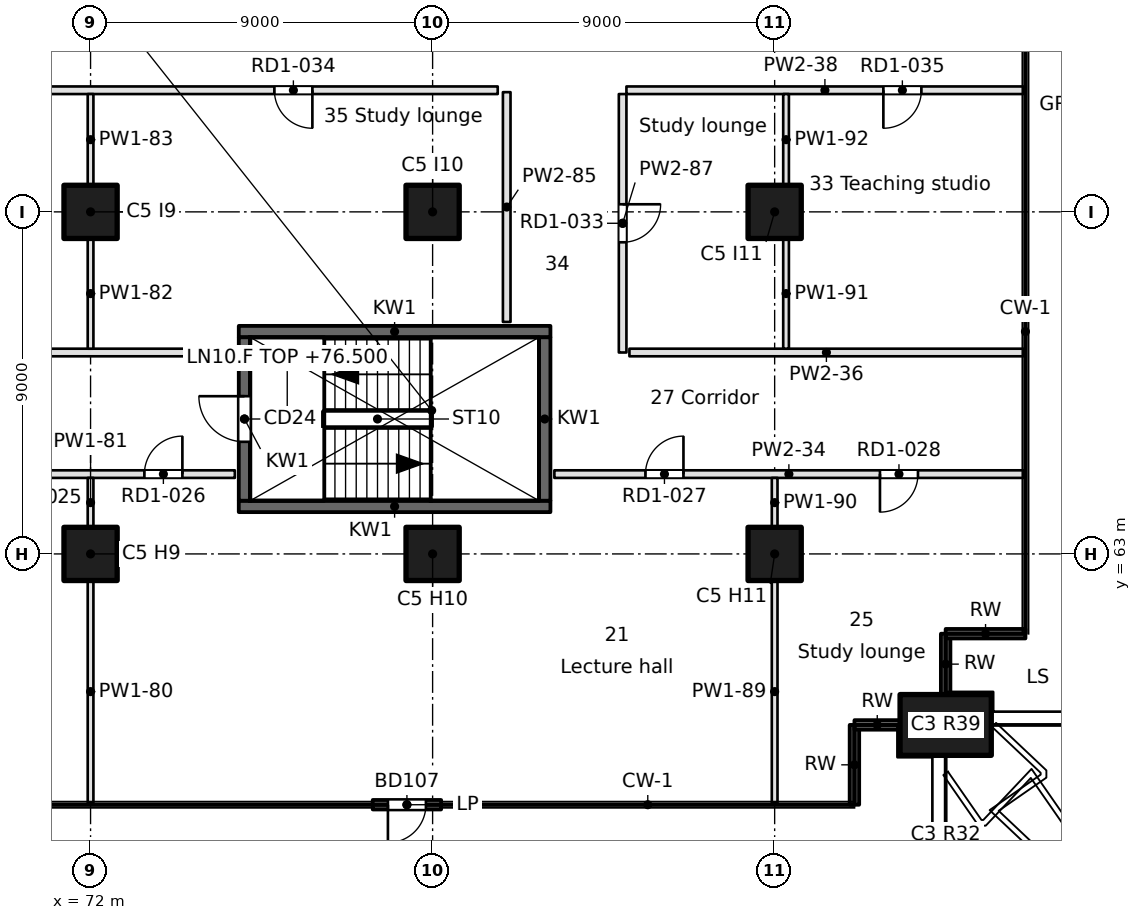
"""IFC4 building model, lengths in metres.
Left out: names, types, materials, properties, quantities, classifications, styles, units other than length and angle.
Written with IfcOpenShell. Run it as: python <this file> out.ifc"""

import sys

from ifc_helpers import new_model, si_unit, direction, frame, frame_2d, origin, origin_2d, place, context, subcontext, project, spatial, rectangle, extrude, element, fill, save


model = new_model("IFC4")
c1 = context("Model", 3, precision=1e-05, world=origin(), true_north=direction((0.0, 1.0)))
c2 = subcontext(c1, "Body", "Model", "MODEL_VIEW")
j1 = project(units=[si_unit("LENGTHUNIT", "METRE"), si_unit("PLANEANGLEUNIT", "RADIAN")], contexts=[c1])
p1 = place(None, origin())
s1 = spatial("IfcSite", under=j1, at=p1, CompositionType="ELEMENT")
p2 = place(p1, origin())
s2 = spatial("IfcBuilding", under=s1, at=p2, CompositionType="ELEMENT")
p3 = place(p2, frame((0.0, 0.0, 76.5)))
s3 = spatial("IfcBuildingStorey", under=s2, at=p3, CompositionType="ELEMENT", Elevation=76.5)
p4 = place(p3, frame((94.5, 58.5, 0.0), z_axis=(0.0, 0.0, 1.0), x_axis=(1.0, 0.0, 0.0)))
e1 = element("IfcColumn", 1, at=p4, inside=s3, PredefinedType="COLUMN", context=c2, shape_type="SweptSolid", body=[
    extrude(rectangle(XDim=2.4, YDim=1.6, at=origin_2d()), origin(), (0.0, 0.0, 1.0), 3.7),
])
for number, where, z_axis, x_axis in (
    (2, (72.0, 63.0, 0.0), (0.0, 0.0, 1.0), (1.0, 0.0, 0.0)),
    (3, (72.0, 72.0, 0.0), (0.0, 0.0, 1.0), (1.0, 0.0, 0.0)),
    (4, (81.0, 63.0, 0.0), (0.0, 0.0, 1.0), (1.0, 0.0, 0.0)),
    (5, (81.0, 72.0, 0.0), (0.0, 0.0, 1.0), (1.0, 0.0, 0.0)),
    (6, (90.0, 63.0, 0.0), (0.0, 0.0, 1.0), (1.0, 0.0, 0.0)),
    (7, (90.0, 72.0, 0.0), (0.0, 0.0, 1.0), (1.0, 0.0, 0.0)),
):
    element("IfcColumn", number, at=place(p3, frame(where, z_axis=z_axis, x_axis=x_axis)), inside=s3, PredefinedType="COLUMN", context=c2, shape_type="SweptSolid", body=[
        extrude(rectangle(XDim=1.4, YDim=1.4, at=origin_2d()), origin(), (0.0, 0.0, 1.0), 3.7),
    ])
p5 = place(p3, frame((79.424, 56.401, 0.0), z_axis=(0.0, 0.0, 1.0), x_axis=(1.0, 0.0, 0.0)))
e8 = element("IfcWall", 8, at=p5, inside=s3, PredefinedType="SOLIDWALL", context=c2, shape_type="SweptSolid", body=[
    extrude(rectangle(XDim=1.8, YDim=0.25, at=frame_2d((0.9, 0.0))), origin(), (0.0, 0.0, 1.0), 3.25),
])
p6 = place(p5, frame((0.4, 0.0, 0.0)))
e9 = element("IfcOpeningElement", 9, at=p6, cuts=e8, PredefinedType="OPENING", context=c2, shape_type="SweptSolid", body=[
    extrude(rectangle(XDim=1.0, YDim=2.1, at=frame_2d((0.5, 1.05))), frame((0.0, 0.125, 0.0), z_axis=(0.0, -1.0, 0.0), x_axis=(1.0, 0.0, 0.0)), (0.0, 0.0, 1.0), 0.25),
])
p7 = place(p3, frame((92.099, 56.401, 0.0), z_axis=(0.0, 0.0, 1.0), x_axis=(0.00011626555, 0.999999993241, 0.0)))
e10 = element("IfcWall", 10, at=p7, inside=s3, PredefinedType="SOLIDWALL", context=c2, shape_type="SweptSolid", body=[
    extrude(rectangle(XDim=2.1, YDim=0.25, at=frame_2d((1.05, 0.0))), origin(), (0.0, 0.0, 1.0), 3.25),
])
p8 = place(p3, frame((92.099, 58.501, 0.0), z_axis=(0.0, 0.0, 1.0), x_axis=(1.0, 0.0, 0.0)))
e11 = element("IfcWall", 11, at=p8, inside=s3, PredefinedType="SOLIDWALL", context=c2, shape_type="SweptSolid", body=[
    extrude(rectangle(XDim=1.201, YDim=0.25, at=frame_2d((0.6, 0.0))), origin(), (0.0, 0.0, 1.0), 3.25),
])
p9 = place(p3, frame((94.499, 59.3, 0.0), z_axis=(0.0, 0.0, 1.0), x_axis=(0.00015253203, 0.999999988367, 0.0)))
e12 = element("IfcWall", 12, at=p9, inside=s3, PredefinedType="SOLIDWALL", context=c2, shape_type="SweptSolid", body=[
    extrude(rectangle(XDim=1.601, YDim=0.25, at=frame_2d((0.8, 0.0))), origin(), (0.0, 0.0, 1.0), 3.25),
])
p10 = place(p3, frame((94.499, 60.901, 0.0), z_axis=(0.0, 0.0, 1.0), x_axis=(0.999999993241, 0.00011626555, 0.0)))
e13 = element("IfcWall", 13, at=p10, inside=s3, PredefinedType="SOLIDWALL", context=c2, shape_type="SweptSolid", body=[
    extrude(rectangle(XDim=2.1, YDim=0.25, at=frame_2d((1.05, 0.0))), origin(), (0.0, 0.0, 1.0), 3.25),
])
for number, where, z_axis, x_axis in (
    (14, (75.9, 64.25, -0.4), (0.0, 0.0, 1.0), (1.0, 0.0, 0.0)),
    (15, (75.9, 68.85, -0.4), (0.0, 0.0, 1.0), (1.0, 0.0, 0.0)),
):
    element("IfcWall", number, at=place(p3, frame(where, z_axis=z_axis, x_axis=x_axis)), inside=s3, PredefinedType="SOLIDWALL", context=c2, shape_type="SweptSolid", body=[
        extrude(rectangle(XDim=8.2, YDim=0.3, at=frame_2d((4.1, 0.0))), origin(), (0.0, 0.0, 1.0), 3.65),
    ])
p11 = place(p3, frame((76.05, 64.4, -0.4), z_axis=(0.0, 0.0, 1.0), x_axis=(0.0, 1.0, 0.0)))
e16 = element("IfcWall", 16, at=p11, inside=s3, PredefinedType="SOLIDWALL", context=c2, shape_type="SweptSolid", body=[
    extrude(rectangle(XDim=4.3, YDim=0.3, at=frame_2d((2.15, 0.0))), origin(), (0.0, 0.0, 1.0), 3.65),
])
p12 = place(p11, frame((1.55, 0.0, 0.4)))
e17 = element("IfcOpeningElement", 17, at=p12, cuts=e16, PredefinedType="OPENING", context=c2, shape_type="SweptSolid", body=[
    extrude(rectangle(XDim=1.2, YDim=2.1, at=frame_2d((0.6, 1.05))), frame((0.0, 0.15, 0.0), z_axis=(0.0, -1.0, 0.0), x_axis=(1.0, 0.0, 0.0)), (0.0, 0.0, 1.0), 0.3),
])
p13 = place(p3, frame((83.95, 64.4, -0.4), z_axis=(0.0, 0.0, 1.0), x_axis=(0.0, 1.0, 0.0)))
e18 = element("IfcWall", 18, at=p13, inside=s3, PredefinedType="SOLIDWALL", context=c2, shape_type="SweptSolid", body=[
    extrude(rectangle(XDim=4.3, YDim=0.3, at=frame_2d((2.15, 0.0))), origin(), (0.0, 0.0, 1.0), 3.65),
])
p14 = place(p3, frame((75.796, 65.1, 0.0), z_axis=(0.0, 0.0, 1.0), x_axis=(-1.0, 0.0, 0.0)))
e19 = element("IfcWall", 19, at=p14, inside=s3, PredefinedType="PARTITIONING", context=c2, shape_type="SweptSolid", body=[
    extrude(rectangle(XDim=36.596, YDim=0.2, at=frame_2d((18.298, 0.0))), origin(), (0.0, 0.0, 1.0), 3.25),
])
p15 = place(p14, frame((28.702, 0.0, 0.0)))
e20 = element("IfcOpeningElement", 20, at=p15, cuts=e19, PredefinedType="OPENING", context=c2, shape_type="SweptSolid", body=[
    extrude(rectangle(XDim=1.0, YDim=2.1, at=frame_2d((0.5, 1.05))), frame((0.0, 0.1, 0.0), z_axis=(0.0, -1.0, 0.0), x_axis=(1.0, 0.0, 0.0)), (0.0, 0.0, 1.0), 0.2),
])
p16 = place(p14, frame((26.202, 0.0, 0.0)))
e21 = element("IfcOpeningElement", 21, at=p16, cuts=e19, PredefinedType="OPENING", context=c2, shape_type="SweptSolid", body=[
    extrude(rectangle(XDim=1.0, YDim=2.1, at=frame_2d((0.5, 1.05))), frame((0.0, 0.1, 0.0), z_axis=(0.0, -1.0, 0.0), x_axis=(1.0, 0.0, 0.0)), (0.0, 0.0, 1.0), 0.2),
])
p17 = place(p14, frame((16.795, 0.0, 0.0)))
e22 = element("IfcOpeningElement", 22, at=p17, cuts=e19, PredefinedType="OPENING", context=c2, shape_type="SweptSolid", body=[
    extrude(rectangle(XDim=1.0, YDim=2.1, at=frame_2d((0.5, 1.05))), frame((0.0, 0.1, 0.0), z_axis=(0.0, -1.0, 0.0), x_axis=(1.0, 0.0, 0.0)), (0.0, 0.0, 1.0), 0.2),
])
p18 = place(p14, frame((14.295, 0.0, 0.0)))
e23 = element("IfcOpeningElement", 23, at=p18, cuts=e19, PredefinedType="OPENING", context=c2, shape_type="SweptSolid", body=[
    extrude(rectangle(XDim=1.0, YDim=2.1, at=frame_2d((0.5, 1.05))), frame((0.0, 0.1, 0.0), z_axis=(0.0, -1.0, 0.0), x_axis=(1.0, 0.0, 0.0)), (0.0, 0.0, 1.0), 0.2),
])
p19 = place(p14, frame((7.772, 0.0, 0.0)))
e24 = element("IfcOpeningElement", 24, at=p19, cuts=e19, PredefinedType="OPENING", context=c2, shape_type="SweptSolid", body=[
    extrude(rectangle(XDim=1.0, YDim=2.1, at=frame_2d((0.5, 1.05))), frame((0.0, 0.1, 0.0), z_axis=(0.0, -1.0, 0.0), x_axis=(1.0, 0.0, 0.0)), (0.0, 0.0, 1.0), 0.2),
])
p20 = place(p14, frame((5.272, 0.0, 0.0)))
e25 = element("IfcOpeningElement", 25, at=p20, cuts=e19, PredefinedType="OPENING", context=c2, shape_type="SweptSolid", body=[
    extrude(rectangle(XDim=1.0, YDim=2.1, at=frame_2d((0.5, 1.05))), frame((0.0, 0.1, 0.0), z_axis=(0.0, -1.0, 0.0), x_axis=(1.0, 0.0, 0.0)), (0.0, 0.0, 1.0), 0.2),
])
p21 = place(p14, frame((1.38, 0.0, 0.0)))
e26 = element("IfcOpeningElement", 26, at=p21, cuts=e19, PredefinedType="OPENING", context=c2, shape_type="SweptSolid", body=[
    extrude(rectangle(XDim=1.0, YDim=2.1, at=frame_2d((0.5, 1.05))), frame((0.0, 0.1, 0.0), z_axis=(0.0, -1.0, 0.0), x_axis=(1.0, 0.0, 0.0)), (0.0, 0.0, 1.0), 0.2),
])
p22 = place(p3, frame((96.545, 65.1, 0.0), z_axis=(0.0, 0.0, 1.0), x_axis=(-1.0, 0.0, 0.0)))
e27 = element("IfcWall", 27, at=p22, inside=s3, PredefinedType="PARTITIONING", context=c2, shape_type="SweptSolid", body=[
    extrude(rectangle(XDim=12.341, YDim=0.2, at=frame_2d((6.17, 0.0))), origin(), (0.0, 0.0, 1.0), 3.25),
])
p23 = place(p22, frame((8.945, 0.0, 0.0)))
e28 = element("IfcOpeningElement", 28, at=p23, cuts=e27, PredefinedType="OPENING", context=c2, shape_type="SweptSolid", body=[
    extrude(rectangle(XDim=1.0, YDim=2.1, at=frame_2d((0.5, 1.05))), frame((0.0, 0.1, 0.0), z_axis=(0.0, -1.0, 0.0), x_axis=(1.0, 0.0, 0.0)), (0.0, 0.0, 1.0), 0.2),
])
p24 = place(p22, frame((2.774, 0.0, 0.0)))
e29 = element("IfcOpeningElement", 29, at=p24, cuts=e27, PredefinedType="OPENING", context=c2, shape_type="SweptSolid", body=[
    extrude(rectangle(XDim=1.0, YDim=2.1, at=frame_2d((0.5, 1.05))), frame((0.0, 0.1, 0.0), z_axis=(0.0, -1.0, 0.0), x_axis=(1.0, 0.0, 0.0)), (0.0, 0.0, 1.0), 0.2),
])
p25 = place(p3, frame((39.2, 68.3, 0.0), z_axis=(0.0, 0.0, 1.0), x_axis=(1.0, 0.0, 0.0)))
e30 = element("IfcWall", 30, at=p25, inside=s3, PredefinedType="PARTITIONING", context=c2, shape_type="SweptSolid", body=[
    extrude(rectangle(XDim=36.596, YDim=0.2, at=frame_2d((18.298, 0.0))), origin(), (0.0, 0.0, 1.0), 3.25),
])
p26 = place(p25, frame((14.289, 0.0, 0.0)))
e31 = element("IfcOpeningElement", 31, at=p26, cuts=e30, PredefinedType="OPENING", context=c2, shape_type="SweptSolid", body=[
    extrude(rectangle(XDim=1.0, YDim=2.1, at=frame_2d((0.5, 1.05))), frame((0.0, 0.1, 0.0), z_axis=(0.0, -1.0, 0.0), x_axis=(1.0, 0.0, 0.0)), (0.0, 0.0, 1.0), 0.2),
])
p27 = place(p25, frame((16.789, 0.0, 0.0)))
e32 = element("IfcOpeningElement", 32, at=p27, cuts=e30, PredefinedType="OPENING", context=c2, shape_type="SweptSolid", body=[
    extrude(rectangle(XDim=1.0, YDim=2.1, at=frame_2d((0.5, 1.05))), frame((0.0, 0.1, 0.0), z_axis=(0.0, -1.0, 0.0), x_axis=(1.0, 0.0, 0.0)), (0.0, 0.0, 1.0), 0.2),
])
p28 = place(p25, frame((27.824, 0.0, 0.0)))
e33 = element("IfcOpeningElement", 33, at=p28, cuts=e30, PredefinedType="OPENING", context=c2, shape_type="SweptSolid", body=[
    extrude(rectangle(XDim=1.0, YDim=2.1, at=frame_2d((0.5, 1.05))), frame((0.0, 0.1, 0.0), z_axis=(0.0, -1.0, 0.0), x_axis=(1.0, 0.0, 0.0)), (0.0, 0.0, 1.0), 0.2),
])
p29 = place(p3, frame((86.178, 68.3, 0.0), z_axis=(0.0, 0.0, 1.0), x_axis=(1.0, 0.0, 0.0)))
e34 = element("IfcWall", 34, at=p29, inside=s3, PredefinedType="PARTITIONING", context=c2, shape_type="SweptSolid", body=[
    extrude(rectangle(XDim=10.366, YDim=0.2, at=frame_2d((5.183, 0.0))), origin(), (0.0, 0.0, 1.0), 3.25),
])
p30 = place(p3, frame((82.713, 75.2, 0.0), z_axis=(0.0, 0.0, 1.0), x_axis=(-1.0, 0.0, 0.0)))
e35 = element("IfcWall", 35, at=p30, inside=s3, PredefinedType="PARTITIONING", context=c2, shape_type="SweptSolid", body=[
    extrude(rectangle(XDim=43.513, YDim=0.2, at=frame_2d((21.757, 0.0))), origin(), (0.0, 0.0, 1.0), 3.25),
])
p31 = place(p30, frame((4.877, 0.0, 0.0)))
e36 = element("IfcOpeningElement", 36, at=p31, cuts=e35, PredefinedType="OPENING", context=c2, shape_type="SweptSolid", body=[
    extrude(rectangle(XDim=1.0, YDim=2.1, at=frame_2d((0.5, 1.05))), frame((0.0, 0.1, 0.0), z_axis=(0.0, -1.0, 0.0), x_axis=(1.0, 0.0, 0.0)), (0.0, 0.0, 1.0), 0.2),
])
p32 = place(p3, frame((96.545, 75.2, 0.0), z_axis=(0.0, 0.0, 1.0), x_axis=(-1.0, 0.0, 0.0)))
e37 = element("IfcWall", 37, at=p32, inside=s3, PredefinedType="PARTITIONING", context=c2, shape_type="SweptSolid", body=[
    extrude(rectangle(XDim=10.445, YDim=0.2, at=frame_2d((5.222, 0.0))), origin(), (0.0, 0.0, 1.0), 3.25),
])
p33 = place(p32, frame((2.685, 0.0, 0.0)))
e38 = element("IfcOpeningElement", 38, at=p33, cuts=e37, PredefinedType="OPENING", context=c2, shape_type="SweptSolid", body=[
    extrude(rectangle(XDim=1.0, YDim=2.1, at=frame_2d((0.5, 1.05))), frame((0.0, 0.1, 0.0), z_axis=(0.0, -1.0, 0.0), x_axis=(1.0, 0.0, 0.0)), (0.0, 0.0, 1.0), 0.2),
])
p34 = place(p3, frame((72.0, 62.3, 0.0), z_axis=(0.0, 0.0, 1.0), x_axis=(0.0, -1.0, 0.0)))
e39 = element("IfcWall", 39, at=p34, inside=s3, PredefinedType="PARTITIONING", context=c2, shape_type="SweptSolid", body=[
    extrude(rectangle(XDim=5.845, YDim=0.15, at=frame_2d((2.923, 0.0))), origin(), (0.0, 0.0, 1.0), 3.25),
])
p35 = place(p3, frame((72.0, 65.0, 0.0), z_axis=(0.0, 0.0, 1.0), x_axis=(0.0, -1.0, 0.0)))
e40 = element("IfcWall", 40, at=p35, inside=s3, PredefinedType="PARTITIONING", context=c2, shape_type="SweptSolid", body=[
    extrude(rectangle(XDim=1.3, YDim=0.15, at=frame_2d((0.65, 0.0))), origin(), (0.0, 0.0, 1.0), 3.25),
])
p36 = place(p3, frame((72.0, 71.3, 0.0), z_axis=(0.0, 0.0, 1.0), x_axis=(0.0, -1.0, 0.0)))
e41 = element("IfcWall", 41, at=p36, inside=s3, PredefinedType="PARTITIONING", context=c2, shape_type="SweptSolid", body=[
    extrude(rectangle(XDim=2.9, YDim=0.15, at=frame_2d((1.45, 0.0))), origin(), (0.0, 0.0, 1.0), 3.25),
])
p37 = place(p3, frame((72.0, 75.1, 0.0), z_axis=(0.0, 0.0, 1.0), x_axis=(0.0, -1.0, 0.0)))
e42 = element("IfcWall", 42, at=p37, inside=s3, PredefinedType="PARTITIONING", context=c2, shape_type="SweptSolid", body=[
    extrude(rectangle(XDim=2.4, YDim=0.15, at=frame_2d((1.2, 0.0))), origin(), (0.0, 0.0, 1.0), 3.25),
])
p38 = place(p3, frame((82.95, 69.104, 0.0), z_axis=(0.0, 0.0, 1.0), x_axis=(0.0, 1.0, 0.0)))
e43 = element("IfcWall", 43, at=p38, inside=s3, PredefinedType="PARTITIONING", context=c2, shape_type="SweptSolid", body=[
    extrude(rectangle(XDim=6.046, YDim=0.2, at=frame_2d((3.023, 0.0))), origin(), (0.0, 0.0, 1.0), 3.25),
])
p39 = place(p3, frame((86.0, 75.1, 0.0), z_axis=(0.0, 0.0, 1.0), x_axis=(0.0, -1.0, 0.0)))
e44 = element("IfcWall", 44, at=p39, inside=s3, PredefinedType="PARTITIONING", context=c2, shape_type="SweptSolid", body=[
    extrude(rectangle(XDim=6.8, YDim=0.2, at=frame_2d((3.4, 0.0))), origin(), (0.0, 0.0, 1.0), 3.25),
])
p40 = place(p39, frame((2.9, 0.0, 0.0)))
e45 = element("IfcOpeningElement", 45, at=p40, cuts=e44, PredefinedType="OPENING", context=c2, shape_type="SweptSolid", body=[
    extrude(rectangle(XDim=1.0, YDim=2.1, at=frame_2d((0.5, 1.05))), frame((0.0, 0.1, 0.0), z_axis=(0.0, -1.0, 0.0), x_axis=(1.0, 0.0, 0.0)), (0.0, 0.0, 1.0), 0.2),
])
p41 = place(p3, frame((90.0, 62.3, 0.0), z_axis=(0.0, 0.0, 1.0), x_axis=(0.0, -1.0, 0.0)))
e46 = element("IfcWall", 46, at=p41, inside=s3, PredefinedType="PARTITIONING", context=c2, shape_type="SweptSolid", body=[
    extrude(rectangle(XDim=5.845, YDim=0.15, at=frame_2d((2.922, 0.0))), origin(), (0.0, 0.0, 1.0), 3.25),
])
p42 = place(p3, frame((90.0, 65.0, 0.0), z_axis=(0.0, 0.0, 1.0), x_axis=(0.0, -1.0, 0.0)))
e47 = element("IfcWall", 47, at=p42, inside=s3, PredefinedType="PARTITIONING", context=c2, shape_type="SweptSolid", body=[
    extrude(rectangle(XDim=1.3, YDim=0.15, at=frame_2d((0.65, 0.0))), origin(), (0.0, 0.0, 1.0), 3.25),
])
p43 = place(p3, frame((90.3, 71.3, 0.0), z_axis=(0.0, 0.0, 1.0), x_axis=(0.0, -1.0, 0.0)))
e48 = element("IfcWall", 48, at=p43, inside=s3, PredefinedType="PARTITIONING", context=c2, shape_type="SweptSolid", body=[
    extrude(rectangle(XDim=2.9, YDim=0.15, at=frame_2d((1.45, 0.0))), origin(), (0.0, 0.0, 1.0), 3.25),
])
p44 = place(p3, frame((90.3, 75.1, 0.0), z_axis=(0.0, 0.0, 1.0), x_axis=(0.0, -1.0, 0.0)))
e49 = element("IfcWall", 49, at=p44, inside=s3, PredefinedType="PARTITIONING", context=c2, shape_type="SweptSolid", body=[
    extrude(rectangle(XDim=2.4, YDim=0.15, at=frame_2d((1.2, 0.0))), origin(), (0.0, 0.0, 1.0), 3.25),
])
p45 = place(p6, frame((1.0, 0.0, 0.0), z_axis=(0.0, 0.0, 1.0), x_axis=(-1.0, 0.0, 0.0)))
e50 = element("IfcDoor", 50, at=p45, inside=s3, OperationType="SINGLE_SWING_RIGHT", PredefinedType="DOOR", context=c2, shape_type="SweptSolid", body=[
    extrude(rectangle(XDim=1.0, YDim=2.1, at=frame_2d((0.5, 1.05))), frame((0.0, 0.025, 0.0), z_axis=(0.0, -1.0, 0.0), x_axis=(1.0, 0.0, 0.0)), (0.0, 0.0, 1.0), 0.05),
])
fill(e9, e50)
p46 = place(p12, origin())
e51 = element("IfcDoor", 51, at=p46, inside=s3, OperationType="SINGLE_SWING_RIGHT", PredefinedType="DOOR", context=c2, shape_type="SweptSolid", body=[
    extrude(rectangle(XDim=1.2, YDim=2.1, at=frame_2d((0.6, 1.05))), frame((0.0, 0.025, 0.0), z_axis=(0.0, -1.0, 0.0), x_axis=(1.0, 0.0, 0.0)), (0.0, 0.0, 1.0), 0.05),
])
fill(e17, e51)
p47 = place(p21, frame((1.0, 0.0, 0.0), z_axis=(0.0, 0.0, 1.0), x_axis=(-1.0, 0.0, 0.0)))
e52 = element("IfcDoor", 52, at=p47, inside=s3, OperationType="SINGLE_SWING_RIGHT", PredefinedType="DOOR", context=c2, shape_type="SweptSolid", body=[
    extrude(rectangle(XDim=1.0, YDim=2.1, at=frame_2d((0.5, 1.05))), frame((0.0, 0.025, 0.0), z_axis=(0.0, -1.0, 0.0), x_axis=(1.0, 0.0, 0.0)), (0.0, 0.0, 1.0), 0.05),
])
fill(e26, e52)
p48 = place(p23, frame((1.0, 0.0, 0.0), z_axis=(0.0, 0.0, 1.0), x_axis=(-1.0, 0.0, 0.0)))
e53 = element("IfcDoor", 53, at=p48, inside=s3, OperationType="SINGLE_SWING_RIGHT", PredefinedType="DOOR", context=c2, shape_type="SweptSolid", body=[
    extrude(rectangle(XDim=1.0, YDim=2.1, at=frame_2d((0.5, 1.05))), frame((0.0, 0.025, 0.0), z_axis=(0.0, -1.0, 0.0), x_axis=(1.0, 0.0, 0.0)), (0.0, 0.0, 1.0), 0.05),
])
fill(e28, e53)
p49 = place(p24, origin())
e54 = element("IfcDoor", 54, at=p49, inside=s3, OperationType="SINGLE_SWING_RIGHT", PredefinedType="DOOR", context=c2, shape_type="SweptSolid", body=[
    extrude(rectangle(XDim=1.0, YDim=2.1, at=frame_2d((0.5, 1.05))), frame((0.0, 0.025, 0.0), z_axis=(0.0, -1.0, 0.0), x_axis=(1.0, 0.0, 0.0)), (0.0, 0.0, 1.0), 0.05),
])
fill(e29, e54)
p50 = place(p40, origin())
e55 = element("IfcDoor", 55, at=p50, inside=s3, OperationType="SINGLE_SWING_LEFT", PredefinedType="DOOR", context=c2, shape_type="SweptSolid", body=[
    extrude(rectangle(XDim=1.0, YDim=2.1, at=frame_2d((0.5, 1.05))), frame((0.0, 0.025, 0.0), z_axis=(0.0, -1.0, 0.0), x_axis=(1.0, 0.0, 0.0)), (0.0, 0.0, 1.0), 0.05),
])
fill(e45, e55)
p51 = place(p31, origin())
e56 = element("IfcDoor", 56, at=p51, inside=s3, OperationType="SINGLE_SWING_LEFT", PredefinedType="DOOR", context=c2, shape_type="SweptSolid", body=[
    extrude(rectangle(XDim=1.0, YDim=2.1, at=frame_2d((0.5, 1.05))), frame((0.0, 0.025, 0.0), z_axis=(0.0, -1.0, 0.0), x_axis=(1.0, 0.0, 0.0)), (0.0, 0.0, 1.0), 0.05),
])
fill(e36, e56)
p52 = place(p33, origin())
e57 = element("IfcDoor", 57, at=p52, inside=s3, OperationType="SINGLE_SWING_RIGHT", PredefinedType="DOOR", context=c2, shape_type="SweptSolid", body=[
    extrude(rectangle(XDim=1.0, YDim=2.1, at=frame_2d((0.5, 1.05))), frame((0.0, 0.025, 0.0), z_axis=(0.0, -1.0, 0.0), x_axis=(1.0, 0.0, 0.0)), (0.0, 0.0, 1.0), 0.05),
])
fill(e38, e57)
save(model, sys.argv[1])
